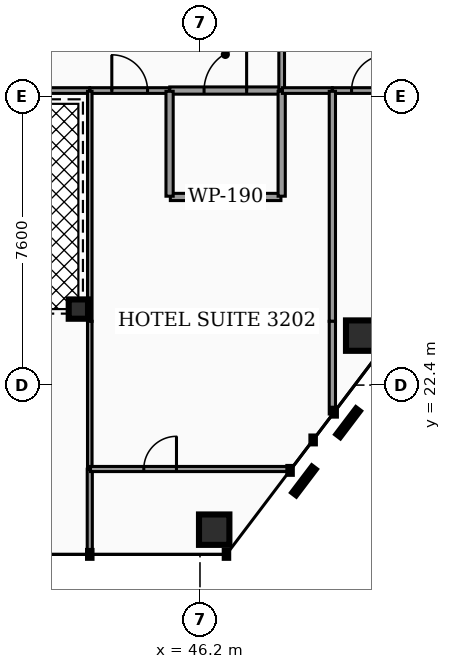
"""IFC4 building model, lengths in metres.
Left out: names, types, materials, properties, quantities, classifications, styles, units other than length and angle.
Written with IfcOpenShell. Run it as: python <this file> out.ifc"""

import sys

from ifc_helpers import new_model, si_unit, direction, frame, frame_2d, origin, origin_2d, place, context, subcontext, project, spatial, rectangle, hollow_rectangle, hollow_circle, extrude, element, fill, save


model = new_model("IFC4")
c1 = context("Model", 3, precision=1e-05, world=origin(), true_north=direction((0.0, 1.0)))
c2 = subcontext(c1, "Body", "Model", "MODEL_VIEW")
j1 = project(units=[si_unit("LENGTHUNIT", "METRE"), si_unit("PLANEANGLEUNIT", "RADIAN")], contexts=[c1])
p1 = place(None, origin())
s1 = spatial("IfcSite", under=j1, at=p1, CompositionType="ELEMENT")
p2 = place(p1, origin())
s2 = spatial("IfcBuilding", under=s1, at=p2, CompositionType="ELEMENT")
p3 = place(p2, frame((0.0, 0.0, 134.64)))
s3 = spatial("IfcBuildingStorey", under=s2, at=p3, CompositionType="ELEMENT", Elevation=134.64)
for number, where, z_axis, x_axis in (
    (1, (46.574, 18.596, 0.0), (0.0, 0.0, 1.0), (1.0, 0.0, 0.0)),
    (2, (50.442, 23.702, 0.0), (0.0, 0.0, 1.0), (1.0, 0.0, 0.0)),
):
    element("IfcColumn", number, at=place(p3, frame(where, z_axis=z_axis, x_axis=x_axis)), inside=s3, PredefinedType="COLUMN", context=c2, shape_type="SweptSolid", body=[
        extrude(hollow_rectangle(XDim=0.8, YDim=0.8, WallThickness=0.04, at=origin_2d()), origin(), (0.0, 0.0, 1.0), 3.5),
    ])
p4 = place(p3, frame((43.0, 24.4, 0.0), z_axis=(0.0, 0.0, 1.0), x_axis=(1.0, 0.0, 0.0)))
e3 = element("IfcColumn", 3, at=p4, inside=s3, PredefinedType="COLUMN", context=c2, shape_type="SweptSolid", body=[
    extrude(hollow_circle(Radius=0.254, WallThickness=0.02, at=origin_2d()), origin(), (0.0, 0.0, 1.0), 3.5),
])
p5 = place(p3, frame((45.405, 30.15, 0.0), z_axis=(0.0, 0.0, 1.0), x_axis=(1.0, 0.0, 0.0)))
e4 = element("IfcWall", 4, at=p5, inside=s3, PredefinedType="PARTITIONING", context=c2, shape_type="SweptSolid", body=[
    extrude(rectangle(XDim=2.925, YDim=0.19, at=frame_2d((1.462, 0.0))), origin(), (0.0, 0.0, 1.0), 2.457),
])
p6 = place(p5, frame((0.903, 0.0, 0.0)))
e5 = element("IfcOpeningElement", 5, at=p6, cuts=e4, PredefinedType="OPENING", context=c2, shape_type="SweptSolid", body=[
    extrude(rectangle(XDim=1.12, YDim=2.05, at=frame_2d((0.56, 1.025))), frame((0.0, 0.105, 0.0), z_axis=(0.0, -1.0, 0.0), x_axis=(1.0, 0.0, 0.0)), (0.0, 0.0, 1.0), 0.21),
])
p7 = place(p3, frame((48.35, 30.17, 0.0), z_axis=(0.0, 0.0, 1.0), x_axis=(0.0, 1.0, 0.0)))
e6 = element("IfcWall", 6, at=p7, inside=s3, PredefinedType="PARTITIONING", context=c2, shape_type="SweptSolid", body=[
    extrude(rectangle(XDim=3.06, YDim=0.15, at=frame_2d((1.53, 0.0))), origin(), (0.0, 0.0, 1.0), 2.457),
])
p8 = place(p7, frame((1.06, 0.0, 0.0)))
e7 = element("IfcOpeningElement", 7, at=p8, cuts=e6, PredefinedType="OPENING", context=c2, shape_type="SweptSolid", body=[
    extrude(rectangle(XDim=0.94, YDim=2.05, at=frame_2d((0.47, 1.025))), frame((0.0, 0.085, 0.0), z_axis=(0.0, -1.0, 0.0), x_axis=(1.0, 0.0, 0.0)), (0.0, 0.0, 1.0), 0.17),
])
p9 = place(p3, frame((35.385, 30.15, 0.0), z_axis=(0.0, 0.0, 1.0), x_axis=(1.0, 0.0, 0.0)))
e8 = element("IfcWall", 8, at=p9, inside=s3, PredefinedType="PARTITIONING", context=c2, shape_type="SweptSolid", body=[
    extrude(rectangle(XDim=7.91, YDim=0.15, at=frame_2d((3.955, 0.0))), origin(), (0.0, 0.0, 1.0), 2.457),
])
p10 = place(p9, frame((0.25, 0.0, 0.0)))
e9 = element("IfcOpeningElement", 9, at=p10, cuts=e8, PredefinedType="OPENING", context=c2, shape_type="SweptSolid", body=[
    extrude(rectangle(XDim=0.88, YDim=2.05, at=frame_2d((0.44, 1.025))), frame((0.0, 0.085, 0.0), z_axis=(0.0, -1.0, 0.0), x_axis=(1.0, 0.0, 0.0)), (0.0, 0.0, 1.0), 0.17),
])
p11 = place(p3, frame((43.305, 30.15, 0.0), z_axis=(0.0, 0.0, 1.0), x_axis=(1.0, 0.0, 0.0)))
e10 = element("IfcWall", 10, at=p11, inside=s3, PredefinedType="PARTITIONING", context=c2, shape_type="SweptSolid", body=[
    extrude(rectangle(XDim=2.09, YDim=0.15, at=frame_2d((1.045, 0.0))), origin(), (0.0, 0.0, 1.0), 2.457),
])
p12 = place(p11, frame((0.575, 0.0, 0.0)))
e11 = element("IfcOpeningElement", 11, at=p12, cuts=e10, PredefinedType="OPENING", context=c2, shape_type="SweptSolid", body=[
    extrude(rectangle(XDim=0.94, YDim=2.05, at=frame_2d((0.47, 1.025))), frame((0.0, 0.085, 0.0), z_axis=(0.0, -1.0, 0.0), x_axis=(1.0, 0.0, 0.0)), (0.0, 0.0, 1.0), 0.17),
])
p13 = place(p3, frame((45.42, 27.35, 0.0), z_axis=(0.0, 0.0, 1.0), x_axis=(1.0, 0.0, 0.0)))
e12 = element("IfcWall", 12, at=p13, inside=s3, PredefinedType="PARTITIONING", context=c2, shape_type="SweptSolid", body=[
    extrude(rectangle(XDim=2.91, YDim=0.19, at=frame_2d((1.455, 0.0))), origin(), (0.0, 0.0, 1.0), 2.457),
])
for number, where, z_axis, x_axis in (
    (13, (45.4, 27.37, 0.0), (0.0, 0.0, 1.0), (0.0, 1.0, 0.0)),
    (14, (48.35, 27.37, 0.0), (0.0, 0.0, 1.0), (0.0, 1.0, 0.0)),
):
    element("IfcWall", number, at=place(p3, frame(where, z_axis=z_axis, x_axis=x_axis)), inside=s3, PredefinedType="PARTITIONING", context=c2, shape_type="SweptSolid", body=[
        extrude(rectangle(XDim=2.76, YDim=0.19, at=frame_2d((1.38, 0.0))), origin(), (0.0, 0.0, 1.0), 2.457),
    ])
p14 = place(p3, frame((48.37, 30.15, 0.0), z_axis=(0.0, 0.0, 1.0), x_axis=(1.0, 0.0, 0.0)))
e15 = element("IfcWall", 15, at=p14, inside=s3, PredefinedType="PARTITIONING", context=c2, shape_type="SweptSolid", body=[
    extrude(rectangle(XDim=1.309, YDim=0.15, at=frame_2d((0.654, 0.0))), origin(), (0.0, 0.0, 1.0), 2.457),
])
p15 = place(p3, frame((49.689, 30.15, 0.0), z_axis=(0.0, 0.0, 1.0), x_axis=(1.0, 0.0, 0.0)))
e16 = element("IfcWall", 16, at=p15, inside=s3, PredefinedType="PARTITIONING", context=c2, shape_type="SweptSolid", body=[
    extrude(rectangle(XDim=1.941, YDim=0.15, at=frame_2d((0.971, 0.0))), origin(), (0.0, 0.0, 1.0), 2.457),
])
p16 = place(p15, frame((0.501, 0.0, 0.0)))
e17 = element("IfcOpeningElement", 17, at=p16, cuts=e16, PredefinedType="OPENING", context=c2, shape_type="SweptSolid", body=[
    extrude(rectangle(XDim=0.94, YDim=2.05, at=frame_2d((0.47, 1.025))), frame((0.0, 0.085, 0.0), z_axis=(0.0, -1.0, 0.0), x_axis=(1.0, 0.0, 0.0)), (0.0, 0.0, 1.0), 0.17),
])
p17 = place(p3, frame((43.3, 24.078, 0.0), z_axis=(0.0, 0.0, 1.0), x_axis=(0.0, 1.0, 0.0)))
e18 = element("IfcWall", 18, at=p17, inside=s3, PredefinedType="PARTITIONING", context=c2, shape_type="SweptSolid", body=[
    extrude(rectangle(XDim=6.052, YDim=0.12, at=frame_2d((3.026, 0.0))), origin(), (0.0, 0.0, 1.0), 2.457),
])
p18 = place(p3, frame((43.3, 20.197, 0.0), z_axis=(0.0, 0.0, 1.0), x_axis=(0.0, 1.0, 0.0)))
e19 = element("IfcWall", 19, at=p18, inside=s3, PredefinedType="PARTITIONING", context=c2, shape_type="SweptSolid", body=[
    extrude(rectangle(XDim=3.881, YDim=0.12, at=frame_2d((1.94, 0.0))), origin(), (0.0, 0.0, 1.0), 2.457),
])
p19 = place(p3, frame((43.3, 17.961, 0.0), z_axis=(0.0, 0.0, 1.0), x_axis=(0.0, 1.0, 0.0)))
e20 = element("IfcWall", 20, at=p19, inside=s3, PredefinedType="PARTITIONING", context=c2, shape_type="SweptSolid", body=[
    extrude(rectangle(XDim=2.226, YDim=0.135, at=frame_2d((1.113, 0.0))), origin(), (0.0, 0.0, 1.0), 2.457),
])
p20 = place(p3, frame((43.32, 20.192, 0.0), z_axis=(0.0, 0.0, 1.0), x_axis=(1.0, 0.0, 0.0)))
e21 = element("IfcWall", 21, at=p20, inside=s3, PredefinedType="PARTITIONING", context=c2, shape_type="SweptSolid", body=[
    extrude(rectangle(XDim=5.263, YDim=0.135, at=frame_2d((2.632, 0.0))), origin(), (0.0, 0.0, 1.0), 2.457),
])
p21 = place(p20, frame((1.402, 0.0, 0.0)))
e22 = element("IfcOpeningElement", 22, at=p21, cuts=e21, PredefinedType="OPENING", context=c2, shape_type="SweptSolid", body=[
    extrude(rectangle(XDim=0.86, YDim=2.05, at=frame_2d((0.43, 1.025))), frame((0.0, 0.077, 0.0), z_axis=(0.0, -1.0, 0.0), x_axis=(1.0, 0.0, 0.0)), (0.0, 0.0, 1.0), 0.155),
])
p22 = place(p3, frame((49.684, 24.078, 0.0), z_axis=(0.0, 0.0, 1.0), x_axis=(0.0, 1.0, 0.0)))
e23 = element("IfcWall", 23, at=p22, inside=s3, PredefinedType="PARTITIONING", context=c2, shape_type="SweptSolid", body=[
    extrude(rectangle(XDim=6.052, YDim=0.165, at=frame_2d((3.026, 0.0))), origin(), (0.0, 0.0, 1.0), 2.457),
])
p23 = place(p3, frame((49.684, 21.639, 0.0), z_axis=(0.0, 0.0, 1.0), x_axis=(0.0, 1.0, 0.0)))
e24 = element("IfcWall", 24, at=p23, inside=s3, PredefinedType="PARTITIONING", context=c2, shape_type="SweptSolid", body=[
    extrude(rectangle(XDim=2.438, YDim=0.165, at=frame_2d((1.219, 0.0))), origin(), (0.0, 0.0, 1.0), 2.457),
])
p24 = place(p6, origin())
e25 = element("IfcDoor", 25, at=p24, inside=s3, OperationType="SINGLE_SWING_RIGHT", PredefinedType="DOOR", context=c2, shape_type="SweptSolid", body=[
    extrude(rectangle(XDim=1.12, YDim=2.05, at=frame_2d((0.56, 1.025))), frame((0.0, 0.025, 0.0), z_axis=(0.0, -1.0, 0.0), x_axis=(1.0, 0.0, 0.0)), (0.0, 0.0, 1.0), 0.05),
])
fill(e5, e25)
p25 = place(p12, origin())
e26 = element("IfcDoor", 26, at=p25, inside=s3, OperationType="SINGLE_SWING_LEFT", PredefinedType="DOOR", context=c2, shape_type="SweptSolid", body=[
    extrude(rectangle(XDim=0.94, YDim=2.05, at=frame_2d((0.47, 1.025))), frame((0.0, 0.025, 0.0), z_axis=(0.0, -1.0, 0.0), x_axis=(1.0, 0.0, 0.0)), (0.0, 0.0, 1.0), 0.05),
])
fill(e11, e26)
p26 = place(p16, origin())
e27 = element("IfcDoor", 27, at=p26, inside=s3, OperationType="SINGLE_SWING_RIGHT", PredefinedType="DOOR", context=c2, shape_type="SweptSolid", body=[
    extrude(rectangle(XDim=0.94, YDim=2.05, at=frame_2d((0.47, 1.025))), frame((0.0, 0.025, 0.0), z_axis=(0.0, -1.0, 0.0), x_axis=(1.0, 0.0, 0.0)), (0.0, 0.0, 1.0), 0.05),
])
fill(e17, e27)
p27 = place(p21, origin())
e28 = element("IfcDoor", 28, at=p27, inside=s3, OperationType="SINGLE_SWING_RIGHT", PredefinedType="DOOR", context=c2, shape_type="SweptSolid", body=[
    extrude(rectangle(XDim=0.86, YDim=2.05, at=frame_2d((0.43, 1.025))), frame((0.0, 0.025, 0.0), z_axis=(0.0, -1.0, 0.0), x_axis=(1.0, 0.0, 0.0)), (0.0, 0.0, 1.0), 0.05),
])
fill(e22, e28)
save(model, sys.argv[1])
